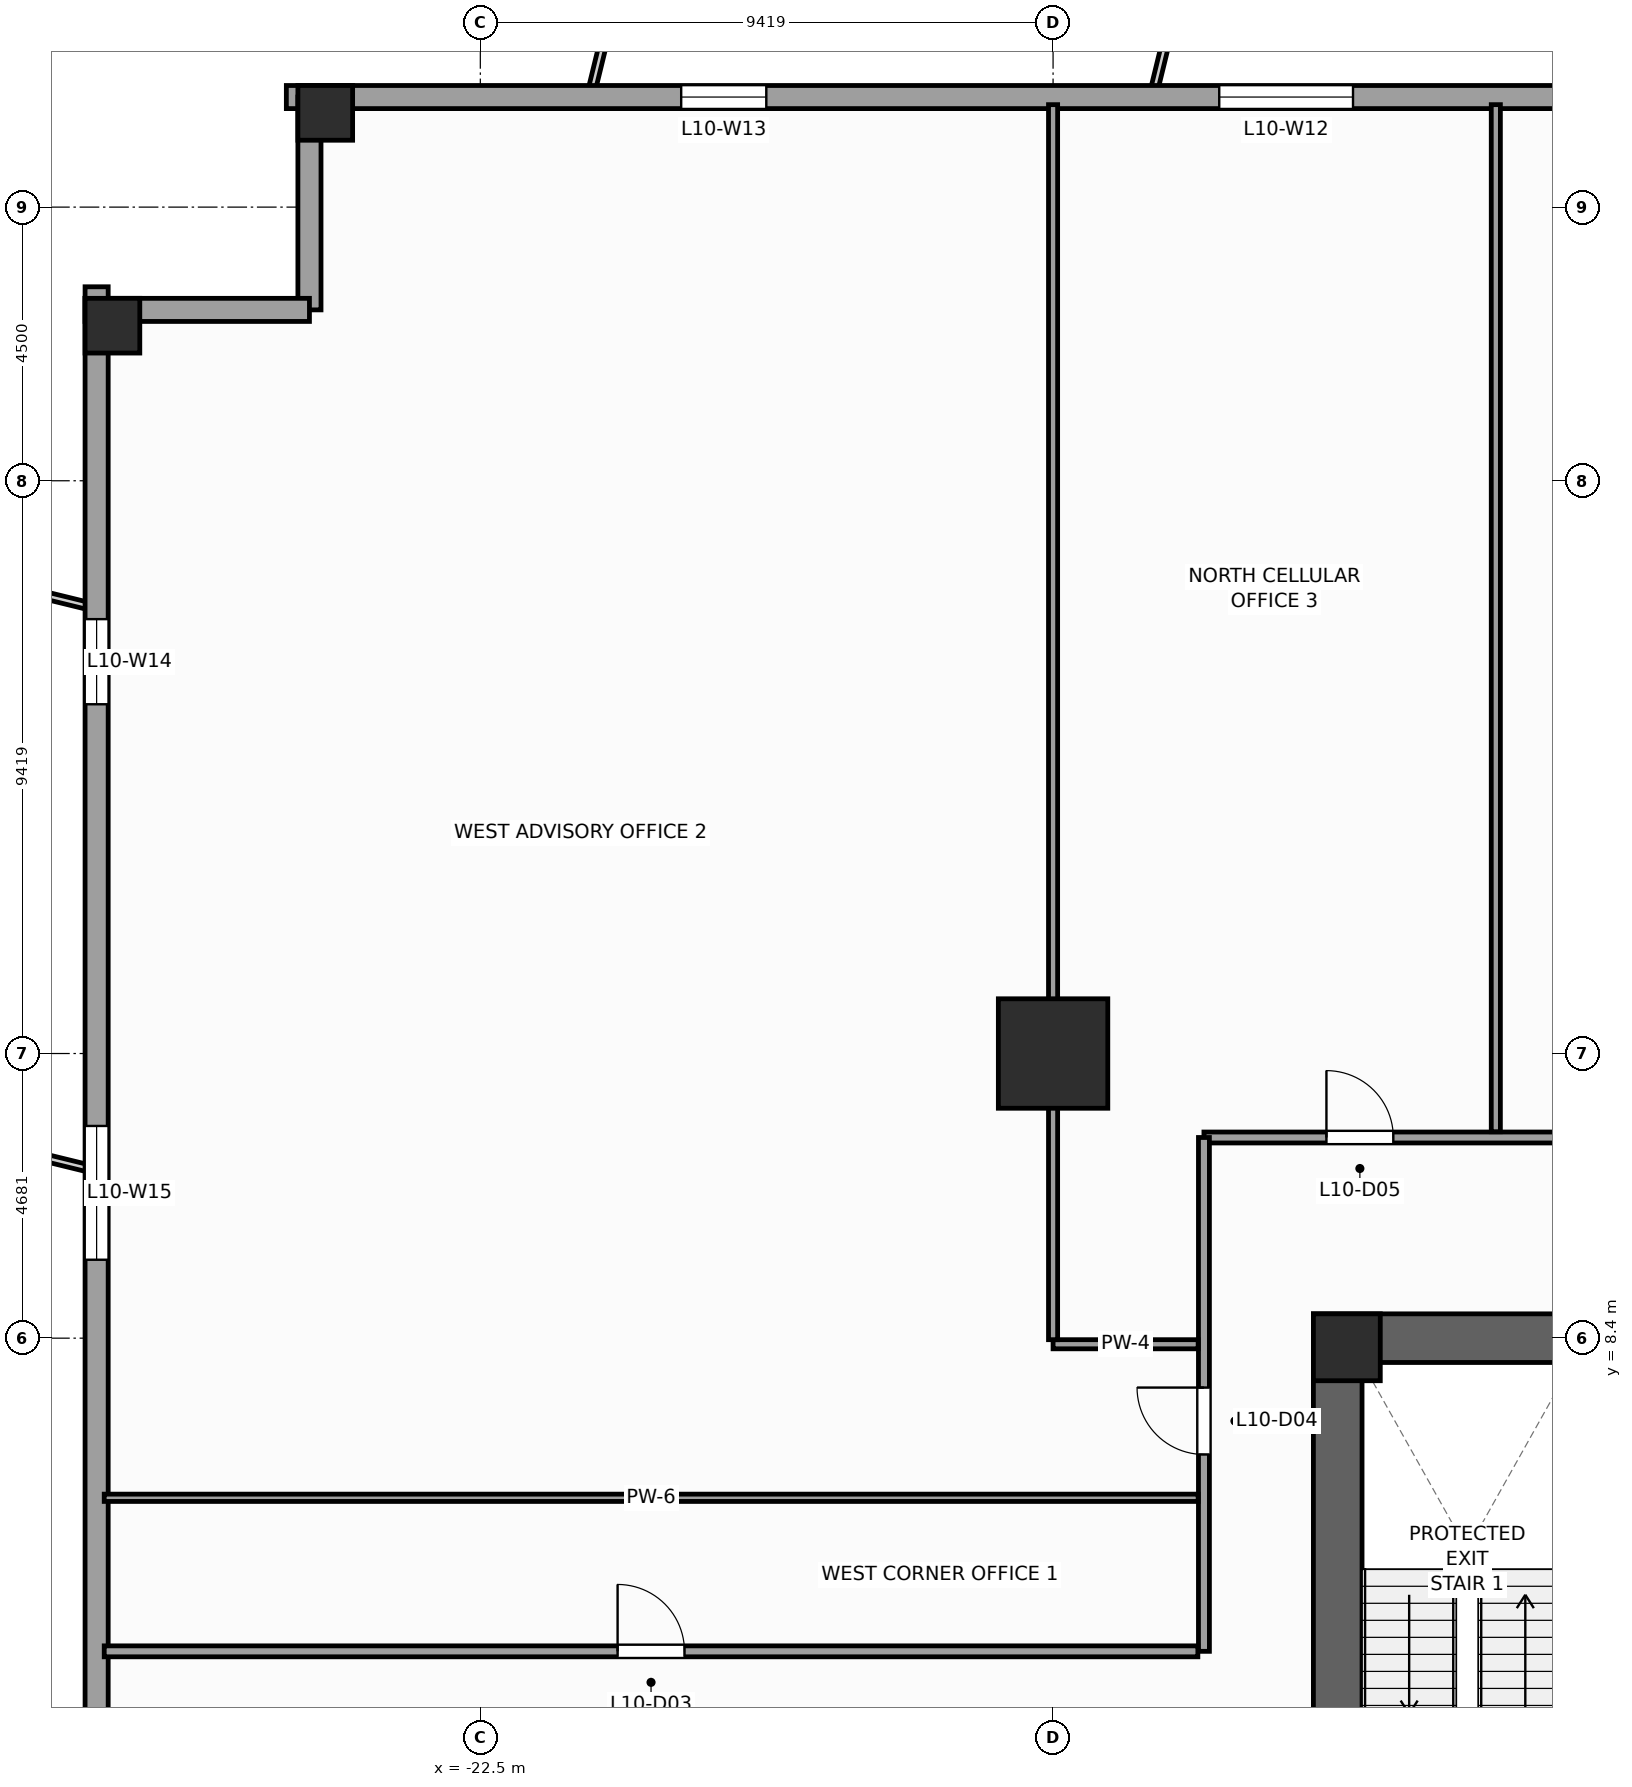
"""IFC4 building model, lengths in metres.
Left out: names, types, materials, properties, quantities, classifications, styles, units other than length and angle.
Written with IfcOpenShell. Run it as: python <this file> out.ifc"""

import sys

from ifc_helpers import new_model, si_unit, direction, frame, frame_2d, origin, origin_2d, place, context, subcontext, project, spatial, rectangle, extrude, source, transform, mapped, element, fill, save


model = new_model("IFC4")
c1 = context("Model", 3, precision=1e-05, world=origin(), true_north=direction((0.0, 1.0)))
c2 = subcontext(c1, "Body", "Model", "MODEL_VIEW")
j1 = project(units=[si_unit("LENGTHUNIT", "METRE"), si_unit("PLANEANGLEUNIT", "RADIAN")], contexts=[c1])
p1 = place(None, origin())
s1 = spatial("IfcSite", under=j1, at=p1, CompositionType="ELEMENT")
p2 = place(p1, origin())
s2 = spatial("IfcBuilding", under=s1, at=p2, CompositionType="ELEMENT")
p3 = place(p2, frame((0.0, 0.0, 46.0)))
s3 = spatial("IfcBuildingStorey", under=s2, at=p3, CompositionType="ELEMENT", Elevation=46.0)
p4 = place(p3, frame((-8.8, 8.4, 0.0), z_axis=(0.0, 0.0, 1.0), x_axis=(1.0, 0.0, 0.0)))
e1 = element("IfcWall", 1, at=p4, inside=s3, PredefinedType="SHEAR", context=c2, shape_type="SweptSolid", body=[
    extrude(rectangle(XDim=17.6, YDim=0.8, at=frame_2d((8.8, 0.0))), origin(), (0.0, 0.0, 1.0), 4.0),
])
p5 = place(p3, frame((-8.4, -8.0, 0.0), z_axis=(0.0, 0.0, 1.0), x_axis=(0.0, 1.0, 0.0)))
e2 = element("IfcWall", 2, at=p5, inside=s3, PredefinedType="SHEAR", context=c2, shape_type="SweptSolid", body=[
    extrude(rectangle(XDim=16.0, YDim=0.8, at=frame_2d((8.0, 0.0))), origin(), (0.0, 0.0, 1.0), 4.0),
])
p6 = place(p5, frame((4.69, 0.0, 0.0)))
e3 = element("IfcOpeningElement", 3, at=p6, cuts=e2, PredefinedType="OPENING", context=c2, shape_type="SweptSolid", body=[
    extrude(rectangle(XDim=1.3, YDim=2.2, at=frame_2d((0.65, 1.1))), frame((0.0, 0.41, 0.0), z_axis=(0.0, -1.0, 0.0), x_axis=(1.0, 0.0, 0.0)), (0.0, 0.0, 1.0), 0.82),
])
m1 = source(origin(), c2, "Body", "SweptSolid", [
    extrude(rectangle(XDim=1.1, YDim=1.1, at=origin_2d()), origin(), (0.0, 0.0, 1.0), 4.0),
])
p7 = place(p3, frame((-8.25, 8.25, 0.0), z_axis=(0.0, 0.0, 1.0), x_axis=(1.0, 0.0, 0.0)))
e4 = element("IfcColumn", 4, at=p7, inside=s3, PredefinedType="PILASTER", context=c2, shape_type="MappedRepresentation", body=[
    mapped(m1, transform((0.0, 0.0, 0.0), scale=1.0)),
])
m2 = source(origin(), c2, "Body", "SweptSolid", [
    extrude(rectangle(XDim=1.8, YDim=1.8, at=origin_2d()), origin(), (0.0, 0.0, 1.0), 4.0),
])
p8 = place(p3, frame((-13.081, 13.081, 0.0), z_axis=(0.0, 0.0, 1.0), x_axis=(1.0, 0.0, 0.0)))
e5 = element("IfcColumn", 5, at=p8, inside=s3, PredefinedType="COLUMN", context=c2, shape_type="MappedRepresentation", body=[
    mapped(m2, transform((0.0, 0.0, 0.0), scale=1.0)),
])
m3 = source(origin(), c2, "Body", "SweptSolid", [
    extrude(rectangle(XDim=0.9, YDim=0.9, at=origin_2d()), origin(), (0.0, 0.0, 1.0), 4.0),
])
for number, where, z_axis, x_axis in (
    (6, (-25.05, 28.55, 0.0), (0.0, 0.0, 1.0), (1.0, 0.0, 0.0)),
    (7, (-28.55, 25.05, 0.0), (0.0, 0.0, 1.0), (1.0, 0.0, 0.0)),
):
    element("IfcColumn", number, at=place(p3, frame(where, z_axis=z_axis, x_axis=x_axis)), inside=s3, PredefinedType="COLUMN", context=c2, shape_type="MappedRepresentation", body=[
        mapped(m3, transform((0.0, 0.0, 0.0), scale=1.0)),
    ])
p9 = place(p3, frame((25.69, 28.81, 0.0), z_axis=(0.0, 0.0, 1.0), x_axis=(-1.0, 0.0, 0.0)))
e8 = element("IfcWall", 8, at=p9, inside=s3, PredefinedType="STANDARD", context=c2, shape_type="SweptSolid", body=[
    extrude(rectangle(XDim=51.38, YDim=0.38, at=frame_2d((25.69, 0.0))), origin(), (0.0, 0.0, 1.0), 3.12),
])
p10 = place(p9, frame((5.466, 0.0, 0.49)))
e9 = element("IfcOpeningElement", 9, at=p10, cuts=e8, PredefinedType="OPENING", context=c2, shape_type="SweptSolid", body=[
    extrude(rectangle(XDim=1.4, YDim=2.4, at=frame_2d((0.7, 1.2))), frame((0.0, 0.2, 0.0), z_axis=(0.0, -1.0, 0.0), x_axis=(1.0, 0.0, 0.0)), (0.0, 0.0, 1.0), 0.4),
])
p11 = place(p9, frame((13.8, 0.0, 0.49)))
e10 = element("IfcOpeningElement", 10, at=p11, cuts=e8, PredefinedType="OPENING", context=c2, shape_type="SweptSolid", body=[
    extrude(rectangle(XDim=2.2, YDim=2.4, at=frame_2d((1.1, 1.2))), frame((0.0, 0.2, 0.0), z_axis=(0.0, -1.0, 0.0), x_axis=(1.0, 0.0, 0.0)), (0.0, 0.0, 1.0), 0.4),
])
p12 = place(p9, frame((22.062, 0.0, 0.49)))
e11 = element("IfcOpeningElement", 11, at=p12, cuts=e8, PredefinedType="OPENING", context=c2, shape_type="SweptSolid", body=[
    extrude(rectangle(XDim=2.2, YDim=2.4, at=frame_2d((1.1, 1.2))), frame((0.0, 0.2, 0.0), z_axis=(0.0, -1.0, 0.0), x_axis=(1.0, 0.0, 0.0)), (0.0, 0.0, 1.0), 0.4),
])
p13 = place(p9, frame((33.838, 0.0, 0.49)))
e12 = element("IfcOpeningElement", 12, at=p13, cuts=e8, PredefinedType="OPENING", context=c2, shape_type="SweptSolid", body=[
    extrude(rectangle(XDim=2.2, YDim=2.4, at=frame_2d((1.1, 1.2))), frame((0.0, 0.2, 0.0), z_axis=(0.0, -1.0, 0.0), x_axis=(1.0, 0.0, 0.0)), (0.0, 0.0, 1.0), 0.4),
])
p14 = place(p9, frame((43.487, 0.0, 0.49)))
e13 = element("IfcOpeningElement", 13, at=p14, cuts=e8, PredefinedType="OPENING", context=c2, shape_type="SweptSolid", body=[
    extrude(rectangle(XDim=1.4, YDim=2.4, at=frame_2d((0.7, 1.2))), frame((0.0, 0.2, 0.0), z_axis=(0.0, -1.0, 0.0), x_axis=(1.0, 0.0, 0.0)), (0.0, 0.0, 1.0), 0.4),
])
p15 = place(p3, frame((-25.31, 28.81, 0.0), z_axis=(0.0, 0.0, 1.0), x_axis=(0.0, -1.0, 0.0)))
e14 = element("IfcWall", 14, at=p15, inside=s3, PredefinedType="STANDARD", context=c2, shape_type="SweptSolid", body=[
    extrude(rectangle(XDim=3.5, YDim=0.38, at=frame_2d((1.75, 0.0))), origin(), (0.0, 0.0, 1.0), 3.72),
])
p16 = place(p3, frame((-25.31, 25.31, 0.0), z_axis=(0.0, 0.0, 1.0), x_axis=(-1.0, 0.0, 0.0)))
e15 = element("IfcWall", 15, at=p16, inside=s3, PredefinedType="STANDARD", context=c2, shape_type="SweptSolid", body=[
    extrude(rectangle(XDim=3.69, YDim=0.38, at=frame_2d((1.845, 0.0))), origin(), (0.0, 0.0, 1.0), 3.72),
])
p17 = place(p3, frame((-28.81, 25.69, 0.0), z_axis=(0.0, 0.0, 1.0), x_axis=(0.0, -1.0, 0.0)))
e16 = element("IfcWall", 16, at=p17, inside=s3, PredefinedType="STANDARD", context=c2, shape_type="SweptSolid", body=[
    extrude(rectangle(XDim=51.38, YDim=0.38, at=frame_2d((25.69, 0.0))), origin(), (0.0, 0.0, 1.0), 3.12),
])
p18 = place(p17, frame((30.765, 0.0, 0.0)))
e17 = element("IfcOpeningElement", 17, at=p18, cuts=e16, PredefinedType="OPENING", context=c2, shape_type="SweptSolid", body=[
    extrude(rectangle(XDim=1.05, YDim=2.25, at=frame_2d((0.525, 1.125))), frame((0.0, 0.2, 0.0), z_axis=(0.0, -1.0, 0.0), x_axis=(1.0, 0.0, 0.0)), (0.0, 0.0, 1.0), 0.4),
])
p19 = place(p17, frame((5.466, 0.0, 0.49)))
e18 = element("IfcOpeningElement", 18, at=p19, cuts=e16, PredefinedType="OPENING", context=c2, shape_type="SweptSolid", body=[
    extrude(rectangle(XDim=1.4, YDim=2.4, at=frame_2d((0.7, 1.2))), frame((0.0, 0.2, 0.0), z_axis=(0.0, -1.0, 0.0), x_axis=(1.0, 0.0, 0.0)), (0.0, 0.0, 1.0), 0.4),
])
p20 = place(p17, frame((13.8, 0.0, 0.49)))
e19 = element("IfcOpeningElement", 19, at=p20, cuts=e16, PredefinedType="OPENING", context=c2, shape_type="SweptSolid", body=[
    extrude(rectangle(XDim=2.2, YDim=2.4, at=frame_2d((1.1, 1.2))), frame((0.0, 0.2, 0.0), z_axis=(0.0, -1.0, 0.0), x_axis=(1.0, 0.0, 0.0)), (0.0, 0.0, 1.0), 0.4),
])
p21 = place(p17, frame((33.838, 0.0, 0.49)))
e20 = element("IfcOpeningElement", 20, at=p21, cuts=e16, PredefinedType="OPENING", context=c2, shape_type="SweptSolid", body=[
    extrude(rectangle(XDim=2.2, YDim=2.4, at=frame_2d((1.1, 1.2))), frame((0.0, 0.2, 0.0), z_axis=(0.0, -1.0, 0.0), x_axis=(1.0, 0.0, 0.0)), (0.0, 0.0, 1.0), 0.4),
])
p22 = place(p17, frame((43.487, 0.0, 0.49)))
e21 = element("IfcOpeningElement", 21, at=p22, cuts=e16, PredefinedType="OPENING", context=c2, shape_type="SweptSolid", body=[
    extrude(rectangle(XDim=1.4, YDim=2.4, at=frame_2d((0.7, 1.2))), frame((0.0, 0.2, 0.0), z_axis=(0.0, -1.0, 0.0), x_axis=(1.0, 0.0, 0.0)), (0.0, 0.0, 1.0), 0.4),
])
p23 = place(p3, frame((-10.6, 11.7, 0.0), z_axis=(0.0, 0.0, 1.0), x_axis=(1.0, 0.0, 0.0)))
e22 = element("IfcWall", 22, at=p23, inside=s3, PredefinedType="PARTITIONING", context=c2, shape_type="SweptSolid", body=[
    extrude(rectangle(XDim=22.3, YDim=0.18, at=frame_2d((11.15, 0.0))), origin(), (0.0, 0.0, 1.0), 3.72),
])
p24 = place(p23, frame((2.014, 0.0, 0.0)))
e23 = element("IfcOpeningElement", 23, at=p24, cuts=e22, PredefinedType="OPENING", context=c2, shape_type="SweptSolid", body=[
    extrude(rectangle(XDim=1.1, YDim=2.2, at=frame_2d((0.55, 1.1))), frame((0.0, 0.1, 0.0), z_axis=(0.0, -1.0, 0.0), x_axis=(1.0, 0.0, 0.0)), (0.0, 0.0, 1.0), 0.2),
])
p25 = place(p23, frame((7.4, 0.0, 0.0)))
e24 = element("IfcOpeningElement", 24, at=p25, cuts=e22, PredefinedType="OPENING", context=c2, shape_type="SweptSolid", body=[
    extrude(rectangle(XDim=1.1, YDim=2.2, at=frame_2d((0.55, 1.1))), frame((0.0, 0.1, 0.0), z_axis=(0.0, -1.0, 0.0), x_axis=(1.0, 0.0, 0.0)), (0.0, 0.0, 1.0), 0.2),
])
p26 = place(p23, frame((13.4, 0.0, 0.0)))
e25 = element("IfcOpeningElement", 25, at=p26, cuts=e22, PredefinedType="OPENING", context=c2, shape_type="SweptSolid", body=[
    extrude(rectangle(XDim=1.1, YDim=2.2, at=frame_2d((0.55, 1.1))), frame((0.0, 0.1, 0.0), z_axis=(0.0, -1.0, 0.0), x_axis=(1.0, 0.0, 0.0)), (0.0, 0.0, 1.0), 0.2),
])
p27 = place(p23, frame((18.835, 0.0, 0.0)))
e26 = element("IfcOpeningElement", 26, at=p27, cuts=e22, PredefinedType="OPENING", context=c2, shape_type="SweptSolid", body=[
    extrude(rectangle(XDim=1.1, YDim=2.2, at=frame_2d((0.55, 1.1))), frame((0.0, 0.1, 0.0), z_axis=(0.0, -1.0, 0.0), x_axis=(1.0, 0.0, 0.0)), (0.0, 0.0, 1.0), 0.2),
])
p28 = place(p3, frame((-10.6, 3.25, 0.0), z_axis=(0.0, 0.0, 1.0), x_axis=(0.0, 1.0, 0.0)))
e27 = element("IfcWall", 27, at=p28, inside=s3, PredefinedType="PARTITIONING", context=c2, shape_type="SweptSolid", body=[
    extrude(rectangle(XDim=8.45, YDim=0.18, at=frame_2d((4.225, 0.0))), origin(), (0.0, 0.0, 1.0), 3.72),
])
p29 = place(p28, frame((3.238, 0.0, 0.0)))
e28 = element("IfcOpeningElement", 28, at=p29, cuts=e27, PredefinedType="OPENING", context=c2, shape_type="SweptSolid", body=[
    extrude(rectangle(XDim=1.1, YDim=2.2, at=frame_2d((0.55, 1.1))), frame((0.0, 0.1, 0.0), z_axis=(0.0, -1.0, 0.0), x_axis=(1.0, 0.0, 0.0)), (0.0, 0.0, 1.0), 0.2),
])
p30 = place(p3, frame((-28.685, 3.25, 0.0), z_axis=(0.0, 0.0, 1.0), x_axis=(1.0, 0.0, 0.0)))
e29 = element("IfcWall", 29, at=p30, inside=s3, PredefinedType="PARTITIONING", context=c2, shape_type="SweptSolid", body=[
    extrude(rectangle(XDim=17.985, YDim=0.18, at=frame_2d((8.993, 0.0))), origin(), (0.0, 0.0, 1.0), 3.72),
])
p31 = place(p30, frame((8.442, 0.0, 0.0)))
e30 = element("IfcOpeningElement", 30, at=p31, cuts=e29, PredefinedType="OPENING", context=c2, shape_type="SweptSolid", body=[
    extrude(rectangle(XDim=1.1, YDim=2.2, at=frame_2d((0.55, 1.1))), frame((0.0, 0.1, 0.0), z_axis=(0.0, -1.0, 0.0), x_axis=(1.0, 0.0, 0.0)), (0.0, 0.0, 1.0), 0.2),
])
p32 = place(p3, frame((-10.695, 8.3, 0.0), z_axis=(0.0, 0.0, 1.0), x_axis=(-1.0, 0.0, 0.0)))
e31 = element("IfcWall", 31, at=p32, inside=s3, PredefinedType="PARTITIONING", context=c2, shape_type="SweptSolid", body=[
    extrude(rectangle(XDim=2.386, YDim=0.15, at=frame_2d((1.193, 0.0))), origin(), (0.0, 0.0, 1.0), 3.72),
])
p33 = place(p3, frame((-13.081, 8.375, 0.0), z_axis=(0.0, 0.0, 1.0), x_axis=(0.0, 1.0, 0.0)))
e32 = element("IfcWall", 32, at=p33, inside=s3, PredefinedType="PARTITIONING", context=c2, shape_type="SweptSolid", body=[
    extrude(rectangle(XDim=20.31, YDim=0.15, at=frame_2d((10.155, 0.0))), origin(), (0.0, 0.0, 1.0), 2.712),
])
p34 = place(p3, frame((-5.8, 11.795, 0.0), z_axis=(0.0, 0.0, 1.0), x_axis=(0.0, 1.0, 0.0)))
e33 = element("IfcWall", 33, at=p34, inside=s3, PredefinedType="PARTITIONING", context=c2, shape_type="SweptSolid", body=[
    extrude(rectangle(XDim=16.89, YDim=0.15, at=frame_2d((8.445, 0.0))), origin(), (0.0, 0.0, 1.0), 3.72),
])
p35 = place(p3, frame((-28.685, 5.775, 0.0), z_axis=(0.0, 0.0, 1.0), x_axis=(1.0, 0.0, 0.0)))
e34 = element("IfcWall", 34, at=p35, inside=s3, PredefinedType="PARTITIONING", context=c2, shape_type="SweptSolid", body=[
    extrude(rectangle(XDim=17.99, YDim=0.12, at=frame_2d((8.995, 0.0))), origin(), (0.0, 0.0, 1.0), 3.72),
])
m4 = source(origin(), c2, "Body", "SweptSolid", [
    extrude(rectangle(XDim=2.2, YDim=2.4, at=frame_2d((1.1, 1.2))), frame((0.0, 0.03, 0.0), z_axis=(0.0, -1.0, 0.0), x_axis=(1.0, 0.0, 0.0)), (0.0, 0.0, 1.0), 0.06),
])
p36 = place(p13, origin())
e35 = element("IfcWindow", 35, at=p36, inside=s3, PartitioningType="SINGLE_PANEL", PredefinedType="WINDOW", context=c2, shape_type="MappedRepresentation", body=[
    mapped(m4, transform((0.0, 0.0, 0.0), scale=1.0)),
])
fill(e12, e35)
m5 = source(origin(), c2, "Body", "SweptSolid", [
    extrude(rectangle(XDim=1.4, YDim=2.4, at=frame_2d((0.7, 1.2))), frame((0.0, 0.03, 0.0), z_axis=(0.0, -1.0, 0.0), x_axis=(1.0, 0.0, 0.0)), (0.0, 0.0, 1.0), 0.06),
])
p37 = place(p14, origin())
e36 = element("IfcWindow", 36, at=p37, inside=s3, PartitioningType="SINGLE_PANEL", PredefinedType="WINDOW", context=c2, shape_type="MappedRepresentation", body=[
    mapped(m5, transform((0.0, 0.0, 0.0), scale=1.0)),
])
fill(e13, e36)
p38 = place(p19, origin())
e37 = element("IfcWindow", 37, at=p38, inside=s3, PartitioningType="SINGLE_PANEL", PredefinedType="WINDOW", context=c2, shape_type="MappedRepresentation", body=[
    mapped(m5, transform((0.0, 0.0, 0.0), scale=1.0)),
])
fill(e18, e37)
p39 = place(p20, origin())
e38 = element("IfcWindow", 38, at=p39, inside=s3, PartitioningType="SINGLE_PANEL", PredefinedType="WINDOW", context=c2, shape_type="MappedRepresentation", body=[
    mapped(m4, transform((0.0, 0.0, 0.0), scale=1.0)),
])
fill(e19, e38)
m6 = source(origin(), c2, "Body", "SweptSolid", [
    extrude(rectangle(XDim=1.1, YDim=2.2, at=frame_2d((0.55, 1.1))), frame((0.0, 0.025, 0.0), z_axis=(0.0, -1.0, 0.0), x_axis=(1.0, 0.0, 0.0)), (0.0, 0.0, 1.0), 0.05),
])
p40 = place(p31, origin())
e39 = element("IfcDoor", 39, at=p40, inside=s3, OperationType="SINGLE_SWING_LEFT", PredefinedType="DOOR", context=c2, shape_type="MappedRepresentation", body=[
    mapped(m6, transform((0.0, 0.0, 0.0), scale=1.0)),
])
fill(e30, e39)
p41 = place(p29, origin())
e40 = element("IfcDoor", 40, at=p41, inside=s3, OperationType="SINGLE_SWING_RIGHT", PredefinedType="DOOR", context=c2, shape_type="MappedRepresentation", body=[
    mapped(m6, transform((0.0, 0.0, 0.0), scale=1.0)),
])
fill(e28, e40)
p42 = place(p24, origin())
e41 = element("IfcDoor", 41, at=p42, inside=s3, OperationType="SINGLE_SWING_LEFT", PredefinedType="DOOR", context=c2, shape_type="MappedRepresentation", body=[
    mapped(m6, transform((0.0, 0.0, 0.0), scale=1.0)),
])
fill(e23, e41)
save(model, sys.argv[1])
